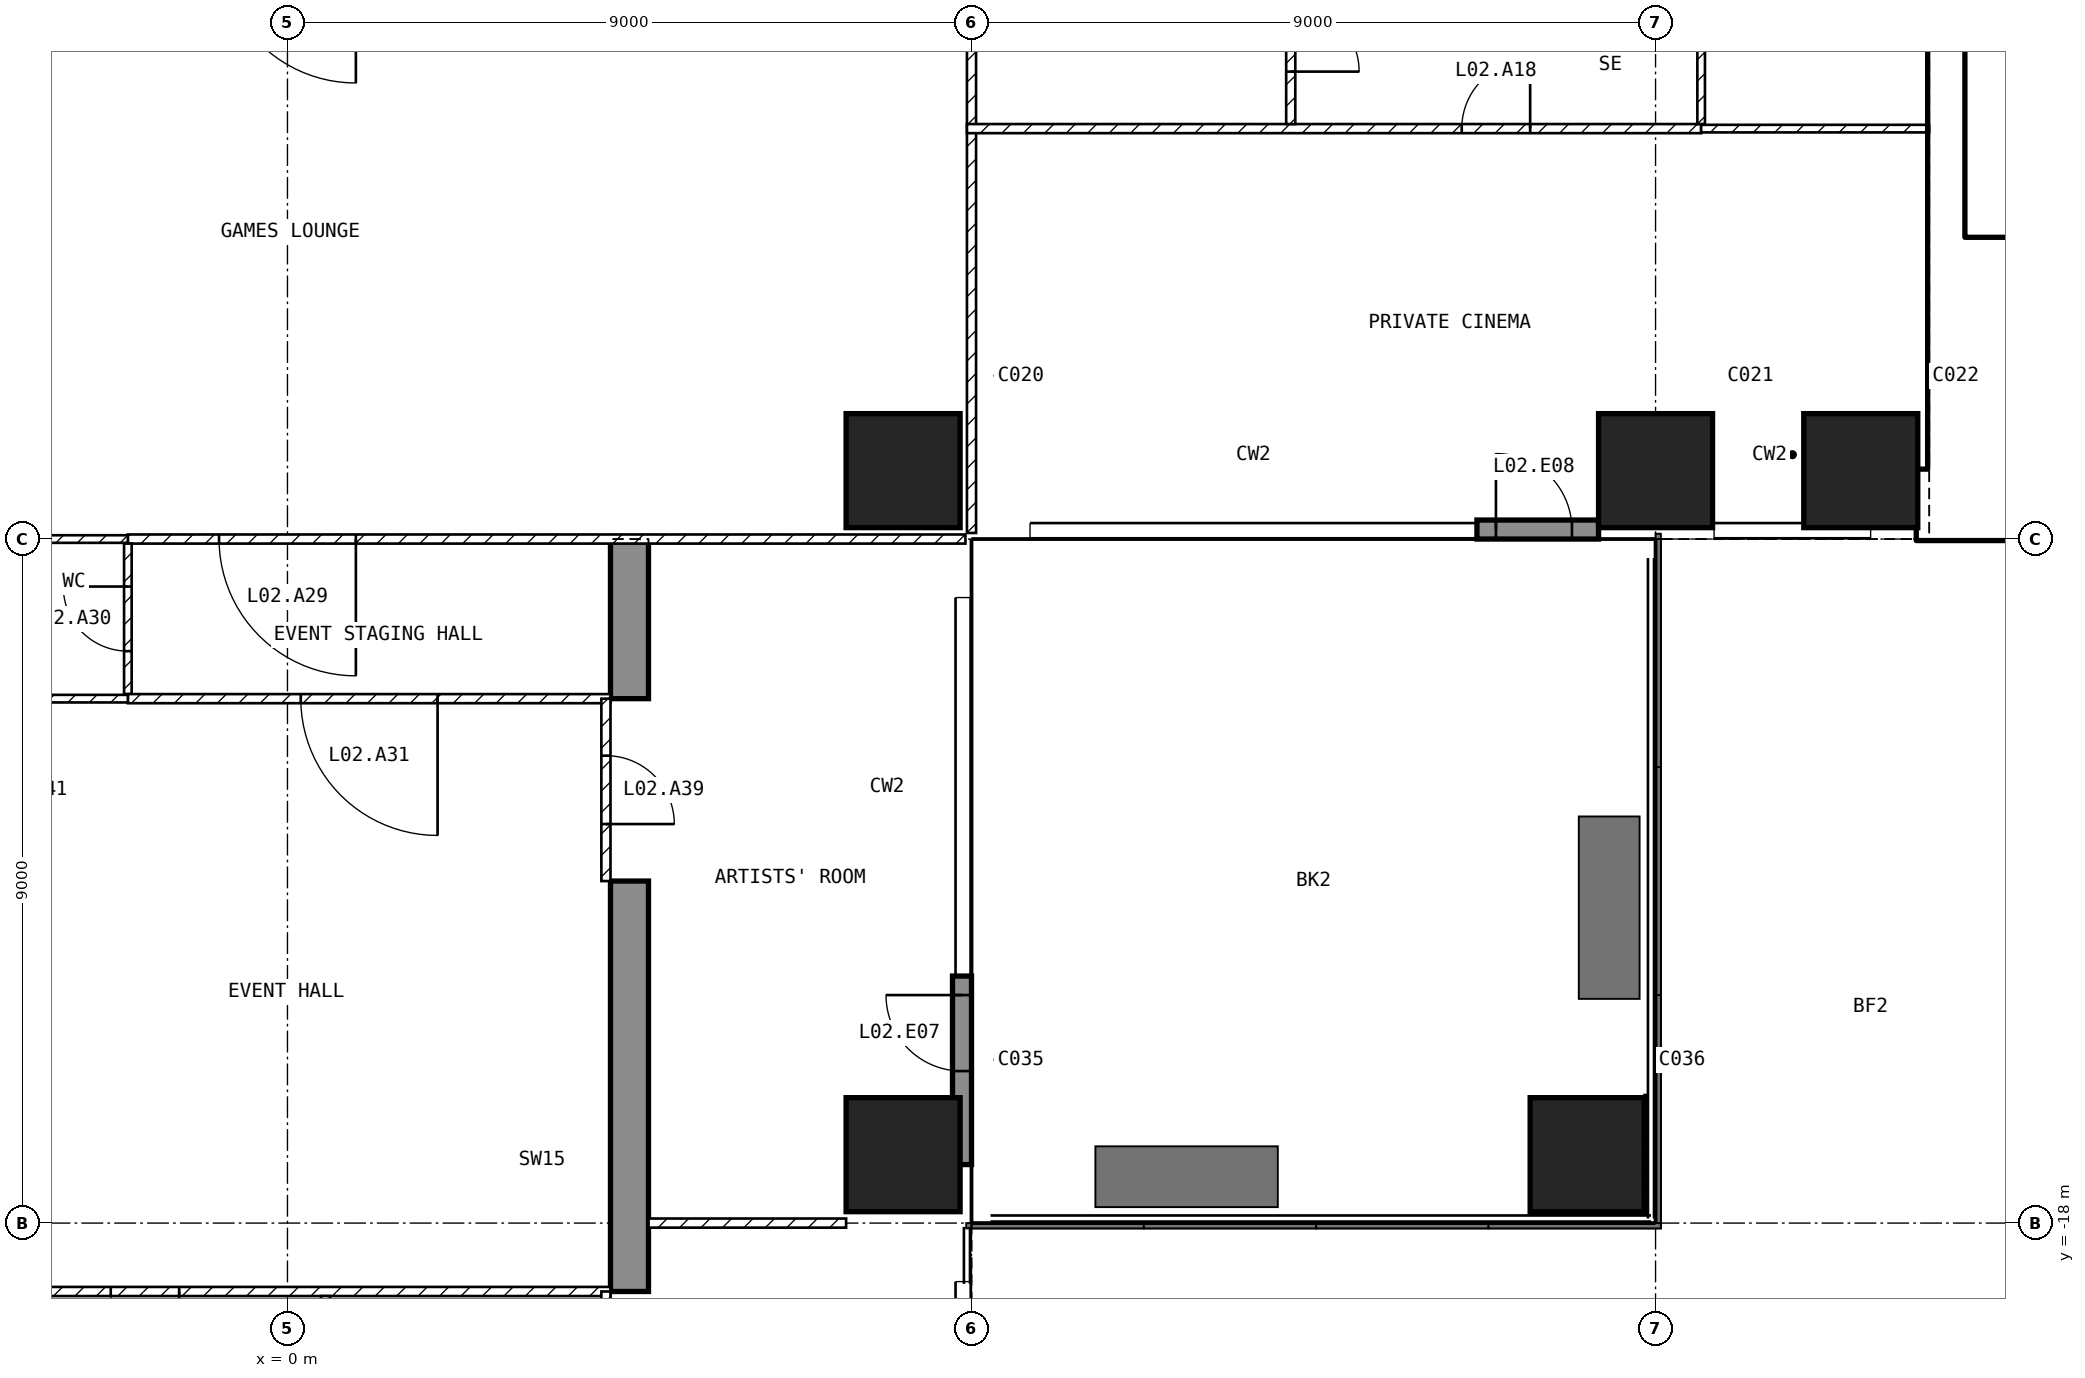
"""IFC4 building model, lengths in metres.
Left out: names, types, materials, properties, quantities, classifications, styles, units other than length and angle.
Written with IfcOpenShell. Run it as: python <this file> out.ifc"""

import sys

from ifc_helpers import new_model, si_unit, direction, frame, frame_2d, origin, origin_2d, place, context, subcontext, project, spatial, polyline, rectangle, outline, extrude, element, fill, save


model = new_model("IFC4")
c1 = context("Model", 3, precision=1e-05, world=origin(), true_north=direction((0.0, 1.0)))
c2 = subcontext(c1, "Body", "Model", "MODEL_VIEW")
j1 = project(units=[si_unit("LENGTHUNIT", "METRE"), si_unit("PLANEANGLEUNIT", "RADIAN")], contexts=[c1])
p1 = place(None, origin())
s1 = spatial("IfcSite", under=j1, at=p1, CompositionType="ELEMENT")
p2 = place(p1, origin())
s2 = spatial("IfcBuilding", under=s1, at=p2, CompositionType="ELEMENT")
p3 = place(p2, frame((0.0, 0.0, 21.0)))
s3 = spatial("IfcBuildingStorey", under=s2, at=p3, CompositionType="ELEMENT", Elevation=21.0)
for number, where, z_axis, x_axis in (
    (1, (8.1, -17.1, -1.4), (0.0, 0.0, 1.0), (1.0, 0.0, 0.0)),
    (2, (8.1, -8.1, -1.4), (0.0, 0.0, 1.0), (1.0, 0.0, 0.0)),
):
    element("IfcColumn", number, at=place(p3, frame(where, z_axis=z_axis, x_axis=x_axis)), inside=s3, PredefinedType="COLUMN", context=c2, shape_type="SweptSolid", body=[
        extrude(rectangle(XDim=1.5, YDim=1.5, at=origin_2d()), origin(), (0.0, 0.0, 1.0), 6.95),
    ])
for number, where, z_axis, x_axis in (
    (3, (18.0, -8.1, -0.3), (0.0, 0.0, 1.0), (1.0, 0.0, 0.0)),
    (4, (20.7, -8.1, -0.3), (0.0, 0.0, 1.0), (1.0, 0.0, 0.0)),
    (5, (17.1, -17.1, -0.3), (0.0, 0.0, 1.0), (1.0, 0.0, 0.0)),
):
    element("IfcColumn", number, at=place(p3, frame(where, z_axis=z_axis, x_axis=x_axis)), inside=s3, PredefinedType="COLUMN", context=c2, shape_type="SweptSolid", body=[
        extrude(rectangle(XDim=1.5, YDim=1.5, at=origin_2d()), origin(), (0.0, 0.0, 1.0), 5.85),
    ])
p4 = place(p3, frame((4.25, -25.35, -0.3), z_axis=(1.0, 0.0, 0.0), x_axis=(0.0, 1.0, 0.0)))
e6 = element("IfcWall", 6, at=p4, inside=s3, PredefinedType="SHEAR", context=c2, shape_type="SweptSolid", body=[
    extrude(outline(polyline([(0.0, 0.0), (4.05, 0.0), (4.05, 2.7), (6.45, 2.7), (6.45, 0.0), (11.85, 0.0), (11.85, 2.7), (14.25, 2.7), (14.25, 0.0), (16.35, 0.0), (16.35, 5.85), (0.0, 5.85), (0.0, 0.0)])), origin(), (0.0, 0.0, 1.0), 0.5),
])
p5 = place(p3, frame((8.875, -17.23, 0.0), z_axis=(0.0, 0.0, 1.0), x_axis=(0.0, 1.0, 0.0)))
e7 = element("IfcWall", 7, at=p5, inside=s3, PredefinedType="SOLIDWALL", context=c2, shape_type="SweptSolid", body=[
    extrude(rectangle(XDim=2.48, YDim=0.25, at=frame_2d((1.24, 0.0))), origin(), (0.0, 0.0, 1.0), 5.55),
])
p6 = place(p5, frame((1.23, 0.0, 0.0)))
e8 = element("IfcOpeningElement", 8, at=p6, cuts=e7, PredefinedType="OPENING", context=c2, shape_type="SweptSolid", body=[
    extrude(rectangle(XDim=1.0, YDim=2.4, at=frame_2d((0.5, 1.2))), frame((0.0, 0.135, 0.0), z_axis=(0.0, -1.0, 0.0), x_axis=(1.0, 0.0, 0.0)), (0.0, 0.0, 1.0), 0.27),
])
p7 = place(p3, frame((15.65, -8.875, 0.0), z_axis=(0.0, 0.0, 1.0), x_axis=(1.0, 0.0, 0.0)))
e9 = element("IfcWall", 9, at=p7, inside=s3, PredefinedType="SOLIDWALL", context=c2, shape_type="SweptSolid", body=[
    extrude(rectangle(XDim=1.6, YDim=0.25, at=frame_2d((0.8, 0.0))), origin(), (0.0, 0.0, 1.0), 5.55),
])
p8 = place(p7, frame((0.25, 0.0, 0.0)))
e10 = element("IfcOpeningElement", 10, at=p8, cuts=e9, PredefinedType="OPENING", context=c2, shape_type="SweptSolid", body=[
    extrude(rectangle(XDim=1.0, YDim=2.4, at=frame_2d((0.5, 1.2))), frame((0.0, 0.135, 0.0), z_axis=(0.0, -1.0, 0.0), x_axis=(1.0, 0.0, 0.0)), (0.0, 0.0, 1.0), 0.27),
])
p9 = place(p3, frame((21.45, -8.55, 0.0), z_axis=(0.0, 0.0, 1.0), x_axis=(1.0, 0.0, 0.0)))
e11 = element("IfcWall", 11, at=p9, inside=s3, PredefinedType="SHEAR", context=c2, shape_type="SweptSolid", body=[
    extrude(rectangle(XDim=10.95, YDim=0.9, at=frame_2d((5.475, 0.0))), origin(), (0.0, 0.0, 1.0), 5.55),
])
p10 = place(p3, frame((21.825, -8.1, 0.0), z_axis=(0.0, 0.0, 1.0), x_axis=(0.0, 1.0, 0.0)))
e12 = element("IfcWall", 12, at=p10, inside=s3, PredefinedType="SHEAR", context=c2, shape_type="SweptSolid", body=[
    extrude(rectangle(XDim=6.9, YDim=0.45, at=frame_2d((3.45, 0.0))), origin(), (0.0, 0.0, 1.0), 5.55),
])
p11 = place(p3, frame((22.05, -5.15, 0.0), z_axis=(0.0, 0.0, 1.0), x_axis=(1.0, 0.0, 0.0)))
e13 = element("IfcWall", 13, at=p11, inside=s3, PredefinedType="SOLIDWALL", context=c2, shape_type="SweptSolid", body=[
    extrude(rectangle(XDim=6.3, YDim=0.2, at=frame_2d((3.15, 0.0))), origin(), (0.0, 0.0, 1.0), 5.55),
])
p12 = place(p11, frame((0.2, 0.0, 0.0)))
e14 = element("IfcOpeningElement", 14, at=p12, cuts=e13, PredefinedType="OPENING", context=c2, shape_type="SweptSolid", body=[
    extrude(rectangle(XDim=1.0, YDim=2.1, at=frame_2d((0.5, 1.05))), frame((0.0, 0.11, 0.0), z_axis=(0.0, -1.0, 0.0), x_axis=(1.0, 0.0, 0.0)), (0.0, 0.0, 1.0), 0.22),
])
p13 = place(p3, frame((9.0, -1.26, 0.0), z_axis=(0.0, 0.0, 1.0), x_axis=(0.0, -1.0, 0.0)))
e15 = element("IfcWall", 15, at=p13, inside=s3, PredefinedType="PARTITIONING", context=c2, shape_type="SweptSolid", body=[
    extrude(rectangle(XDim=7.66, YDim=0.12, at=frame_2d((3.83, 0.0))), origin(), (0.0, 0.0, 1.0), 5.55),
])
p14 = place(p3, frame((8.92, -9.0, 0.0), z_axis=(0.0, 0.0, 1.0), x_axis=(-1.0, 0.0, 0.0)))
e16 = element("IfcWall", 16, at=p14, inside=s3, PredefinedType="PARTITIONING", context=c2, shape_type="SweptSolid", body=[
    extrude(rectangle(XDim=11.02, YDim=0.12, at=frame_2d((5.51, 0.0))), origin(), (0.0, 0.0, 1.0), 5.55),
])
p15 = place(p14, frame((8.02, 0.0, 0.0)))
e17 = element("IfcOpeningElement", 17, at=p15, cuts=e16, PredefinedType="OPENING", context=c2, shape_type="SweptSolid", body=[
    extrude(rectangle(XDim=1.8, YDim=2.1, at=frame_2d((0.9, 1.05))), frame((0.0, 0.07, 0.0), z_axis=(0.0, -1.0, 0.0), x_axis=(1.0, 0.0, 0.0)), (0.0, 0.0, 1.0), 0.14),
])
p16 = place(p3, frame((-2.1, -9.0, 0.0), z_axis=(0.0, 0.0, 1.0), x_axis=(-1.0, 0.0, 0.0)))
e18 = element("IfcWall", 18, at=p16, inside=s3, PredefinedType="PARTITIONING", context=c2, shape_type="SweptSolid", body=[
    extrude(rectangle(XDim=2.4, YDim=0.1, at=frame_2d((1.2, 0.0))), origin(), (0.0, 0.0, 1.0), 5.55),
])
p17 = place(p3, frame((8.94, -3.6, 0.0), z_axis=(0.0, 0.0, 1.0), x_axis=(1.0, 0.0, 0.0)))
e19 = element("IfcWall", 19, at=p17, inside=s3, PredefinedType="PARTITIONING", context=c2, shape_type="SweptSolid", body=[
    extrude(rectangle(XDim=9.66, YDim=0.12, at=frame_2d((4.83, 0.0))), origin(), (0.0, 0.0, 1.0), 5.55),
])
p18 = place(p17, frame((6.51, 0.0, 0.0)))
e20 = element("IfcOpeningElement", 20, at=p18, cuts=e19, PredefinedType="OPENING", context=c2, shape_type="SweptSolid", body=[
    extrude(rectangle(XDim=0.9, YDim=2.1, at=frame_2d((0.45, 1.05))), frame((0.0, 0.07, 0.0), z_axis=(0.0, -1.0, 0.0), x_axis=(1.0, 0.0, 0.0)), (0.0, 0.0, 1.0), 0.14),
])
p19 = place(p3, frame((18.6, -3.6, 0.0), z_axis=(0.0, 0.0, 1.0), x_axis=(1.0, 0.0, 0.0)))
e21 = element("IfcWall", 21, at=p19, inside=s3, PredefinedType="PARTITIONING", context=c2, shape_type="SweptSolid", body=[
    extrude(rectangle(XDim=3.0, YDim=0.1, at=frame_2d((1.5, 0.0))), origin(), (0.0, 0.0, 1.0), 5.55),
])
p20 = place(p3, frame((13.2, -1.26, 0.0), z_axis=(0.0, 0.0, 1.0), x_axis=(0.0, -1.0, 0.0)))
e22 = element("IfcWall", 22, at=p20, inside=s3, PredefinedType="PARTITIONING", context=c2, shape_type="SweptSolid", body=[
    extrude(rectangle(XDim=2.28, YDim=0.12, at=frame_2d((1.14, 0.0))), origin(), (0.0, 0.0, 1.0), 4.857),
])
p21 = place(p20, frame((0.69, 0.0, 0.0)))
e23 = element("IfcOpeningElement", 23, at=p21, cuts=e22, PredefinedType="OPENING", context=c2, shape_type="SweptSolid", body=[
    extrude(rectangle(XDim=0.9, YDim=2.1, at=frame_2d((0.45, 1.05))), frame((0.0, 0.07, 0.0), z_axis=(0.0, -1.0, 0.0), x_axis=(1.0, 0.0, 0.0)), (0.0, 0.0, 1.0), 0.14),
])
p22 = place(p3, frame((18.6, -1.26, 0.0), z_axis=(0.0, 0.0, 1.0), x_axis=(0.0, -1.0, 0.0)))
e24 = element("IfcWall", 24, at=p22, inside=s3, PredefinedType="PARTITIONING", context=c2, shape_type="SweptSolid", body=[
    extrude(rectangle(XDim=2.28, YDim=0.1, at=frame_2d((1.14, 0.0))), origin(), (0.0, 0.0, 1.0), 5.55),
])
p23 = place(p3, frame((-2.1, -11.04, 0.0), z_axis=(0.0, 0.0, 1.0), x_axis=(0.0, 1.0, 0.0)))
e25 = element("IfcWall", 25, at=p23, inside=s3, PredefinedType="PARTITIONING", context=c2, shape_type="SweptSolid", body=[
    extrude(rectangle(XDim=1.98, YDim=0.1, at=frame_2d((0.99, 0.0))), origin(), (0.0, 0.0, 1.0), 5.55),
])
p24 = place(p23, frame((0.565, 0.0, 0.0)))
e26 = element("IfcOpeningElement", 26, at=p24, cuts=e25, PredefinedType="OPENING", context=c2, shape_type="SweptSolid", body=[
    extrude(rectangle(XDim=0.85, YDim=2.1, at=frame_2d((0.425, 1.05))), frame((0.0, 0.06, 0.0), z_axis=(0.0, -1.0, 0.0), x_axis=(1.0, 0.0, 0.0)), (0.0, 0.0, 1.0), 0.12),
])
p25 = place(p3, frame((4.25, -11.1, 0.0), z_axis=(0.0, 0.0, 1.0), x_axis=(-1.0, 0.0, 0.0)))
e27 = element("IfcWall", 27, at=p25, inside=s3, PredefinedType="PARTITIONING", context=c2, shape_type="SweptSolid", body=[
    extrude(rectangle(XDim=6.35, YDim=0.12, at=frame_2d((3.175, 0.0))), origin(), (0.0, 0.0, 1.0), 5.55),
])
p26 = place(p25, frame((2.275, 0.0, 0.0)))
e28 = element("IfcOpeningElement", 28, at=p26, cuts=e27, PredefinedType="OPENING", context=c2, shape_type="SweptSolid", body=[
    extrude(rectangle(XDim=1.8, YDim=2.1, at=frame_2d((0.9, 1.05))), frame((0.0, 0.07, 0.0), z_axis=(0.0, -1.0, 0.0), x_axis=(1.0, 0.0, 0.0)), (0.0, 0.0, 1.0), 0.14),
])
p27 = place(p3, frame((-2.1, -11.1, 0.0), z_axis=(0.0, 0.0, 1.0), x_axis=(-1.0, 0.0, 0.0)))
e29 = element("IfcWall", 29, at=p27, inside=s3, PredefinedType="PARTITIONING", context=c2, shape_type="SweptSolid", body=[
    extrude(rectangle(XDim=2.15, YDim=0.1, at=frame_2d((1.075, 0.0))), origin(), (0.0, 0.0, 1.0), 5.55),
])
p28 = place(p3, frame((4.25, -18.9, 0.0), z_axis=(0.0, 0.0, 1.0), x_axis=(-1.0, 0.0, 0.0)))
e30 = element("IfcWall", 30, at=p28, inside=s3, PredefinedType="PARTITIONING", context=c2, shape_type="SweptSolid", body=[
    extrude(rectangle(XDim=8.5, YDim=0.12, at=frame_2d((4.25, 0.0))), origin(), (0.0, 0.0, 1.0), 5.55),
])
p29 = place(p28, frame((5.675, 0.0, 0.0)))
e31 = element("IfcOpeningElement", 31, at=p29, cuts=e30, PredefinedType="OPENING", context=c2, shape_type="SweptSolid", body=[
    extrude(rectangle(XDim=0.9, YDim=2.1, at=frame_2d((0.45, 1.05))), frame((0.0, 0.07, 0.0), z_axis=(0.0, -1.0, 0.0), x_axis=(1.0, 0.0, 0.0)), (0.0, 0.0, 1.0), 0.14),
])
p30 = place(p3, frame((0.5, -18.96, 0.0), z_axis=(0.0, 0.0, 1.0), x_axis=(0.0, -1.0, 0.0)))
e32 = element("IfcWall", 32, at=p30, inside=s3, PredefinedType="PARTITIONING", context=c2, shape_type="SweptSolid", body=[
    extrude(rectangle(XDim=4.38, YDim=0.12, at=frame_2d((2.19, 0.0))), origin(), (0.0, 0.0, 1.0), 5.55),
])
p31 = place(p30, frame((1.74, 0.0, 0.0)))
e33 = element("IfcOpeningElement", 33, at=p31, cuts=e32, PredefinedType="OPENING", context=c2, shape_type="SweptSolid", body=[
    extrude(rectangle(XDim=0.9, YDim=2.1, at=frame_2d((0.45, 1.05))), frame((0.0, 0.07, 0.0), z_axis=(0.0, -1.0, 0.0), x_axis=(1.0, 0.0, 0.0)), (0.0, 0.0, 1.0), 0.14),
])
p32 = place(p3, frame((7.35, -18.0, 0.0), z_axis=(0.0, 0.0, 1.0), x_axis=(-1.0, 0.0, 0.0)))
e34 = element("IfcWall", 34, at=p32, inside=s3, PredefinedType="PARTITIONING", context=c2, shape_type="SweptSolid", body=[
    extrude(rectangle(XDim=2.6, YDim=0.12, at=frame_2d((1.3, 0.0))), origin(), (0.0, 0.0, 1.0), 5.55),
])
p33 = place(p3, frame((4.19, -11.1, 0.0), z_axis=(0.0, 0.0, 1.0), x_axis=(0.0, -1.0, 0.0)))
e35 = element("IfcWall", 35, at=p33, inside=s3, PredefinedType="PARTITIONING", context=c2, shape_type="SweptSolid", body=[
    extrude(rectangle(XDim=2.4, YDim=0.12, at=frame_2d((1.2, 0.0))), origin(), (0.0, 0.0, 1.0), 2.4),
])
p34 = place(p33, frame((0.75, 0.0, 0.0)))
e36 = element("IfcOpeningElement", 36, at=p34, cuts=e35, PredefinedType="OPENING", context=c2, shape_type="SweptSolid", body=[
    extrude(rectangle(XDim=0.9, YDim=2.1, at=frame_2d((0.45, 1.05))), frame((0.0, 0.07, 0.0), z_axis=(0.0, -1.0, 0.0), x_axis=(1.0, 0.0, 0.0)), (0.0, 0.0, 1.0), 0.14),
])
p35 = place(p3, frame((4.19, -18.9, 0.0), z_axis=(0.0, 0.0, 1.0), x_axis=(0.0, -1.0, 0.0)))
e37 = element("IfcWall", 37, at=p35, inside=s3, PredefinedType="PARTITIONING", context=c2, shape_type="SweptSolid", body=[
    extrude(rectangle(XDim=2.4, YDim=0.12, at=frame_2d((1.2, 0.0))), origin(), (0.0, 0.0, 1.0), 2.4),
])
p36 = place(p35, frame((0.75, 0.0, 0.0)))
e38 = element("IfcOpeningElement", 38, at=p36, cuts=e37, PredefinedType="OPENING", context=c2, shape_type="SweptSolid", body=[
    extrude(rectangle(XDim=0.9, YDim=2.1, at=frame_2d((0.45, 1.05))), frame((0.0, 0.07, 0.0), z_axis=(0.0, -1.0, 0.0), x_axis=(1.0, 0.0, 0.0)), (0.0, 0.0, 1.0), 0.14),
])
p37 = place(p6, origin())
e39 = element("IfcDoor", 39, at=p37, inside=s3, OperationType="SINGLE_SWING_RIGHT", PredefinedType="DOOR", context=c2, shape_type="SweptSolid", body=[
    extrude(rectangle(XDim=1.0, YDim=2.4, at=frame_2d((0.5, 1.2))), frame((0.0, 0.025, 0.0), z_axis=(0.0, -1.0, 0.0), x_axis=(1.0, 0.0, 0.0)), (0.0, 0.0, 1.0), 0.05),
])
fill(e8, e39)
p38 = place(p8, origin())
e40 = element("IfcDoor", 40, at=p38, inside=s3, OperationType="SINGLE_SWING_LEFT", PredefinedType="DOOR", context=c2, shape_type="SweptSolid", body=[
    extrude(rectangle(XDim=1.0, YDim=2.4, at=frame_2d((0.5, 1.2))), frame((0.0, 0.025, 0.0), z_axis=(0.0, -1.0, 0.0), x_axis=(1.0, 0.0, 0.0)), (0.0, 0.0, 1.0), 0.05),
])
fill(e10, e40)
p39 = place(p12, origin())
e41 = element("IfcDoor", 41, at=p39, inside=s3, OperationType="SINGLE_SWING_LEFT", PredefinedType="DOOR", context=c2, shape_type="SweptSolid", body=[
    extrude(rectangle(XDim=1.0, YDim=2.1, at=frame_2d((0.5, 1.05))), frame((0.0, 0.025, 0.0), z_axis=(0.0, -1.0, 0.0), x_axis=(1.0, 0.0, 0.0)), (0.0, 0.0, 1.0), 0.05),
])
fill(e14, e41)
p40 = place(p18, origin())
e42 = element("IfcDoor", 42, at=p40, inside=s3, OperationType="SINGLE_SWING_RIGHT", PredefinedType="DOOR", context=c2, shape_type="SweptSolid", body=[
    extrude(rectangle(XDim=0.9, YDim=2.1, at=frame_2d((0.45, 1.05))), frame((0.0, 0.025, 0.0), z_axis=(0.0, -1.0, 0.0), x_axis=(1.0, 0.0, 0.0)), (0.0, 0.0, 1.0), 0.05),
])
fill(e20, e42)
p41 = place(p21, origin())
e43 = element("IfcDoor", 43, at=p41, inside=s3, OperationType="SINGLE_SWING_RIGHT", PredefinedType="DOOR", context=c2, shape_type="SweptSolid", body=[
    extrude(rectangle(XDim=0.9, YDim=2.1, at=frame_2d((0.45, 1.05))), frame((0.0, 0.025, 0.0), z_axis=(0.0, -1.0, 0.0), x_axis=(1.0, 0.0, 0.0)), (0.0, 0.0, 1.0), 0.05),
])
fill(e23, e43)
p42 = place(p15, origin())
e44 = element("IfcDoor", 44, at=p42, inside=s3, OperationType="SINGLE_SWING_LEFT", PredefinedType="DOOR", context=c2, shape_type="SweptSolid", body=[
    extrude(rectangle(XDim=1.8, YDim=2.1, at=frame_2d((0.9, 1.05))), frame((0.0, 0.025, 0.0), z_axis=(0.0, -1.0, 0.0), x_axis=(1.0, 0.0, 0.0)), (0.0, 0.0, 1.0), 0.05),
])
fill(e17, e44)
p43 = place(p24, origin())
e45 = element("IfcDoor", 45, at=p43, inside=s3, OperationType="SINGLE_SWING_RIGHT", PredefinedType="DOOR", context=c2, shape_type="SweptSolid", body=[
    extrude(rectangle(XDim=0.85, YDim=2.1, at=frame_2d((0.425, 1.05))), frame((0.0, 0.025, 0.0), z_axis=(0.0, -1.0, 0.0), x_axis=(1.0, 0.0, 0.0)), (0.0, 0.0, 1.0), 0.05),
])
fill(e26, e45)
p44 = place(p26, origin())
e46 = element("IfcDoor", 46, at=p44, inside=s3, OperationType="SINGLE_SWING_LEFT", PredefinedType="DOOR", context=c2, shape_type="SweptSolid", body=[
    extrude(rectangle(XDim=1.8, YDim=2.1, at=frame_2d((0.9, 1.05))), frame((0.0, 0.025, 0.0), z_axis=(0.0, -1.0, 0.0), x_axis=(1.0, 0.0, 0.0)), (0.0, 0.0, 1.0), 0.05),
])
fill(e28, e46)
p45 = place(p29, origin())
e47 = element("IfcDoor", 47, at=p45, inside=s3, OperationType="SINGLE_SWING_LEFT", PredefinedType="DOOR", context=c2, shape_type="SweptSolid", body=[
    extrude(rectangle(XDim=0.9, YDim=2.1, at=frame_2d((0.45, 1.05))), frame((0.0, 0.025, 0.0), z_axis=(0.0, -1.0, 0.0), x_axis=(1.0, 0.0, 0.0)), (0.0, 0.0, 1.0), 0.05),
])
fill(e31, e47)
p46 = place(p34, origin())
e48 = element("IfcDoor", 48, at=p46, inside=s3, OperationType="SINGLE_SWING_RIGHT", PredefinedType="DOOR", context=c2, shape_type="SweptSolid", body=[
    extrude(rectangle(XDim=0.9, YDim=2.1, at=frame_2d((0.45, 1.05))), frame((0.0, 0.025, 0.0), z_axis=(0.0, -1.0, 0.0), x_axis=(1.0, 0.0, 0.0)), (0.0, 0.0, 1.0), 0.05),
])
fill(e36, e48)
save(model, sys.argv[1])
